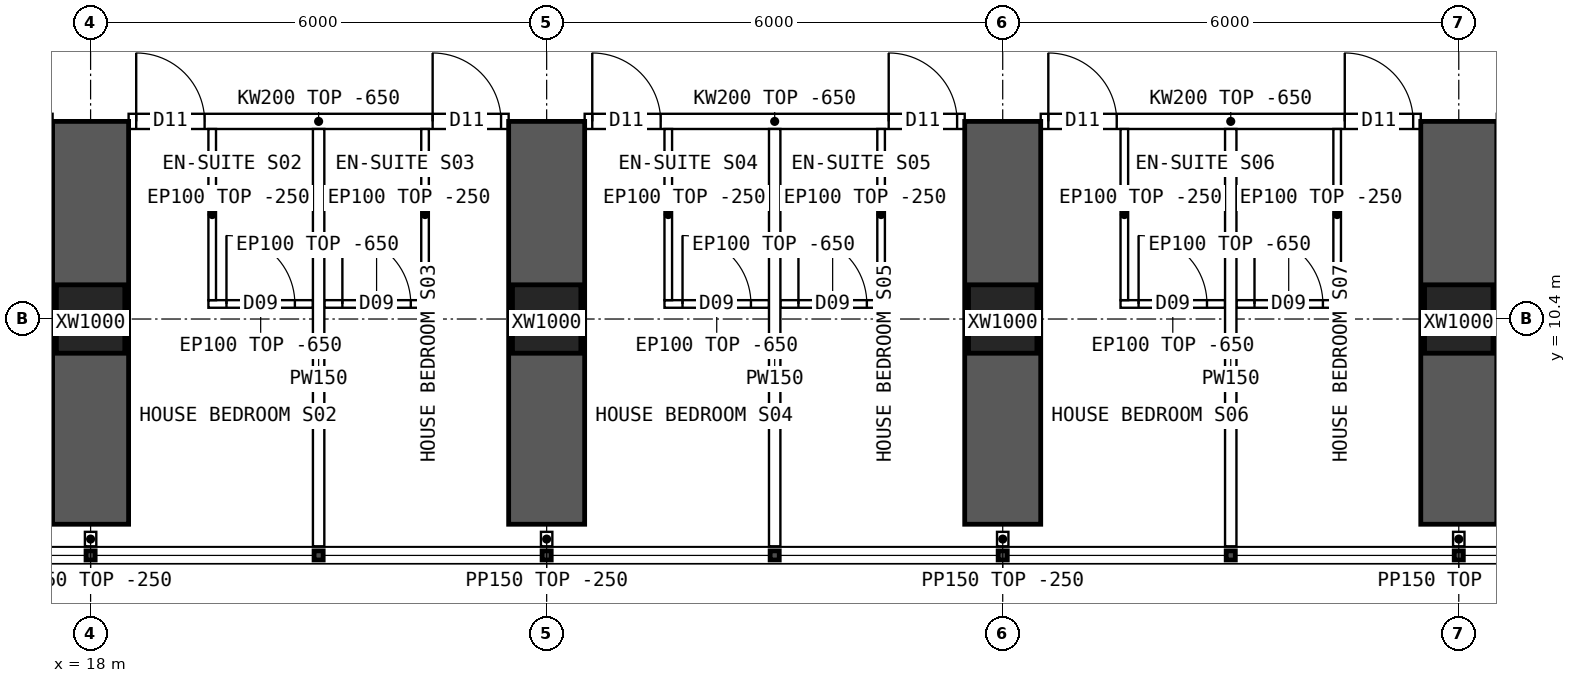
"""IFC4 building model, lengths in metres.
Left out: names, types, materials, properties, quantities, classifications, styles, units other than length and angle.
Written with IfcOpenShell. Run it as: python <this file> out.ifc"""

import sys

from ifc_helpers import new_model, si_unit, direction, frame, frame_2d, origin, origin_2d, place, context, subcontext, project, spatial, polyline, rectangle, hollow_rectangle, outline, extrude, element, fill, save


model = new_model("IFC4")
c1 = context("Model", 3, precision=1e-05, world=origin(), true_north=direction((0.0, 1.0)))
c2 = subcontext(c1, "Body", "Model", "MODEL_VIEW")
j1 = project(units=[si_unit("LENGTHUNIT", "METRE"), si_unit("PLANEANGLEUNIT", "RADIAN")], contexts=[c1])
p1 = place(None, origin())
s1 = spatial("IfcSite", under=j1, at=p1, CompositionType="ELEMENT")
p2 = place(p1, origin())
s2 = spatial("IfcBuilding", under=s1, at=p2, CompositionType="ELEMENT")
p3 = place(p2, frame((0.0, 0.0, 38.95)))
s3 = spatial("IfcBuildingStorey", under=s2, at=p3, CompositionType="ELEMENT", Elevation=38.95)
for number, where, z_axis, x_axis in (
    (1, (18.0, 10.4, 0.0), (0.0, 0.0, 1.0), (1.0, 0.0, 0.0)),
    (2, (24.0, 10.4, 0.0), (0.0, 0.0, 1.0), (1.0, 0.0, 0.0)),
    (3, (30.0, 10.4, 0.0), (0.0, 0.0, 1.0), (1.0, 0.0, 0.0)),
    (4, (36.0, 10.4, 0.0), (0.0, 0.0, 1.0), (1.0, 0.0, 0.0)),
):
    element("IfcColumn", number, at=place(p3, frame(where, z_axis=z_axis, x_axis=x_axis)), inside=s3, PredefinedType="COLUMN", context=c2, shape_type="SweptSolid", body=[
        extrude(hollow_rectangle(XDim=0.9, YDim=0.9, WallThickness=0.09, at=origin_2d()), origin(), (0.0, 0.0, 1.0), 3.75),
    ])
for number, where, z_axis, x_axis in (
    (5, (18.0, 7.7, 0.0), (0.0, 0.0, 1.0), (0.0, 1.0, 0.0)),
    (6, (24.0, 7.7, 0.0), (0.0, 0.0, 1.0), (0.0, 1.0, 0.0)),
    (7, (30.0, 7.7, 0.0), (0.0, 0.0, 1.0), (0.0, 1.0, 0.0)),
    (8, (36.0, 7.7, 0.0), (0.0, 0.0, 1.0), (0.0, 1.0, 0.0)),
):
    element("IfcWall", number, at=place(p3, frame(where, z_axis=z_axis, x_axis=x_axis)), inside=s3, PredefinedType="SHEAR", context=c2, shape_type="SweptSolid", body=[
        extrude(rectangle(XDim=5.3, YDim=1.0, at=frame_2d((2.65, 0.0))), origin(), (0.0, 0.0, 1.0), 3.75),
    ])
p4 = place(p3, frame((18.5, 13.0, 0.0), z_axis=(0.0, 0.0, 1.0), x_axis=(1.0, 0.0, 0.0)))
e9 = element("IfcWall", 9, at=p4, inside=s3, PredefinedType="SOLIDWALL", context=c2, shape_type="SweptSolid", body=[
    extrude(outline(polyline([(0.0, 0.0), (5.0, 0.0), (5.0, 3.1), (0.0, 3.1), (0.0, 0.0)])), frame((0.0, 0.1, 0.0), z_axis=(0.0, -1.0, 0.0), x_axis=(1.0, 0.0, 0.0)), (0.0, 0.0, 1.0), 0.2),
])
p5 = place(p4, frame((0.1, 0.0, 0.0)))
e10 = element("IfcOpeningElement", 10, at=p5, cuts=e9, PredefinedType="OPENING", context=c2, shape_type="SweptSolid", body=[
    extrude(rectangle(XDim=0.9, YDim=2.1, at=frame_2d((0.45, 1.05))), frame((0.0, 0.11, 0.0), z_axis=(0.0, -1.0, 0.0), x_axis=(1.0, 0.0, 0.0)), (0.0, 0.0, 1.0), 0.22),
])
p6 = place(p4, frame((4.0, 0.0, 0.0)))
e11 = element("IfcOpeningElement", 11, at=p6, cuts=e9, PredefinedType="OPENING", context=c2, shape_type="SweptSolid", body=[
    extrude(rectangle(XDim=0.9, YDim=2.1, at=frame_2d((0.45, 1.05))), frame((0.0, 0.11, 0.0), z_axis=(0.0, -1.0, 0.0), x_axis=(1.0, 0.0, 0.0)), (0.0, 0.0, 1.0), 0.22),
])
p7 = place(p3, frame((24.5, 13.0, 0.0), z_axis=(0.0, 0.0, 1.0), x_axis=(1.0, 0.0, 0.0)))
e12 = element("IfcWall", 12, at=p7, inside=s3, PredefinedType="SOLIDWALL", context=c2, shape_type="SweptSolid", body=[
    extrude(outline(polyline([(0.0, 0.0), (5.0, 0.0), (5.0, 3.1), (0.0, 3.1), (0.0, 0.0)])), frame((0.0, 0.1, 0.0), z_axis=(0.0, -1.0, 0.0), x_axis=(1.0, 0.0, 0.0)), (0.0, 0.0, 1.0), 0.2),
])
p8 = place(p7, frame((0.1, 0.0, 0.0)))
e13 = element("IfcOpeningElement", 13, at=p8, cuts=e12, PredefinedType="OPENING", context=c2, shape_type="SweptSolid", body=[
    extrude(rectangle(XDim=0.9, YDim=2.1, at=frame_2d((0.45, 1.05))), frame((0.0, 0.11, 0.0), z_axis=(0.0, -1.0, 0.0), x_axis=(1.0, 0.0, 0.0)), (0.0, 0.0, 1.0), 0.22),
])
p9 = place(p7, frame((4.0, 0.0, 0.0)))
e14 = element("IfcOpeningElement", 14, at=p9, cuts=e12, PredefinedType="OPENING", context=c2, shape_type="SweptSolid", body=[
    extrude(rectangle(XDim=0.9, YDim=2.1, at=frame_2d((0.45, 1.05))), frame((0.0, 0.11, 0.0), z_axis=(0.0, -1.0, 0.0), x_axis=(1.0, 0.0, 0.0)), (0.0, 0.0, 1.0), 0.22),
])
p10 = place(p3, frame((30.5, 13.0, 0.0), z_axis=(0.0, 0.0, 1.0), x_axis=(1.0, 0.0, 0.0)))
e15 = element("IfcWall", 15, at=p10, inside=s3, PredefinedType="SOLIDWALL", context=c2, shape_type="SweptSolid", body=[
    extrude(outline(polyline([(0.0, 0.0), (5.0, 0.0), (5.0, 3.1), (0.0, 3.1), (0.0, 0.0)])), frame((0.0, 0.1, 0.0), z_axis=(0.0, -1.0, 0.0), x_axis=(1.0, 0.0, 0.0)), (0.0, 0.0, 1.0), 0.2),
])
p11 = place(p10, frame((0.1, 0.0, 0.0)))
e16 = element("IfcOpeningElement", 16, at=p11, cuts=e15, PredefinedType="OPENING", context=c2, shape_type="SweptSolid", body=[
    extrude(rectangle(XDim=0.9, YDim=2.1, at=frame_2d((0.45, 1.05))), frame((0.0, 0.11, 0.0), z_axis=(0.0, -1.0, 0.0), x_axis=(1.0, 0.0, 0.0)), (0.0, 0.0, 1.0), 0.22),
])
p12 = place(p10, frame((4.0, 0.0, 0.0)))
e17 = element("IfcOpeningElement", 17, at=p12, cuts=e15, PredefinedType="OPENING", context=c2, shape_type="SweptSolid", body=[
    extrude(rectangle(XDim=0.9, YDim=2.1, at=frame_2d((0.45, 1.05))), frame((0.0, 0.11, 0.0), z_axis=(0.0, -1.0, 0.0), x_axis=(1.0, 0.0, 0.0)), (0.0, 0.0, 1.0), 0.22),
])
p13 = place(p3, frame((21.0, 7.41, 0.0), z_axis=(0.0, 0.0, 1.0), x_axis=(0.0, 1.0, 0.0)))
e18 = element("IfcWall", 18, at=p13, inside=s3, PredefinedType="PARTITIONING", context=c2, shape_type="SweptSolid", body=[
    extrude(outline(polyline([(0.0, 0.0), (5.49, 0.0), (5.49, 3.1), (5.442, 3.1), (5.44, 3.5), (3.192, 3.5), (3.19, 3.1), (2.792, 3.1), (2.79, 3.5), (0.0, 3.5), (0.0, 0.0)])), frame((0.0, 0.075, 0.0), z_axis=(0.0, -1.0, 0.0), x_axis=(1.0, 0.0, 0.0)), (0.0, 0.0, 1.0), 0.15),
])
p14 = place(p3, frame((20.925, 10.598, 0.0), z_axis=(0.0, 0.0, 1.0), x_axis=(-1.0, 0.0, 0.0)))
e19 = element("IfcWall", 19, at=p14, inside=s3, PredefinedType="PARTITIONING", context=c2, shape_type="SweptSolid", body=[
    extrude(outline(polyline([(0.0, 0.0), (1.375, 0.0), (1.375, 3.1), (0.0, 3.1), (0.0, 0.0)])), frame((0.0, 0.05, 0.0), z_axis=(0.0, -1.0, 0.0), x_axis=(1.0, 0.0, 0.0)), (0.0, 0.0, 1.0), 0.1),
])
p15 = place(p14, frame((0.238, 0.0, 0.0)))
e20 = element("IfcOpeningElement", 20, at=p15, cuts=e19, PredefinedType="OPENING", context=c2, shape_type="SweptSolid", body=[
    extrude(rectangle(XDim=0.9, YDim=2.1, at=frame_2d((0.45, 1.05))), frame((0.0, 0.06, 0.0), z_axis=(0.0, -1.0, 0.0), x_axis=(1.0, 0.0, 0.0)), (0.0, 0.0, 1.0), 0.12),
])
p16 = place(p3, frame((19.6, 10.648, 0.0), z_axis=(0.0, 0.0, 1.0), x_axis=(0.0, 1.0, 0.0)))
e21 = element("IfcWall", 21, at=p16, inside=s3, PredefinedType="PARTITIONING", context=c2, shape_type="SweptSolid", body=[
    extrude(outline(polyline([(0.0, 0.0), (2.252, 0.0), (2.252, 3.1), (2.204, 3.1), (2.202, 3.5), (0.0, 3.5), (0.0, 0.0)])), frame((0.0, 0.05, 0.0), z_axis=(0.0, -1.0, 0.0), x_axis=(1.0, 0.0, 0.0)), (0.0, 0.0, 1.0), 0.1),
])
p17 = place(p3, frame((22.45, 10.598, 0.0), z_axis=(0.0, 0.0, 1.0), x_axis=(-1.0, 0.0, 0.0)))
e22 = element("IfcWall", 22, at=p17, inside=s3, PredefinedType="PARTITIONING", context=c2, shape_type="SweptSolid", body=[
    extrude(outline(polyline([(0.0, 0.0), (1.375, 0.0), (1.375, 3.1), (0.0, 3.1), (0.0, 0.0)])), frame((0.0, 0.05, 0.0), z_axis=(0.0, -1.0, 0.0), x_axis=(1.0, 0.0, 0.0)), (0.0, 0.0, 1.0), 0.1),
])
p18 = place(p17, frame((0.238, 0.0, 0.0)))
e23 = element("IfcOpeningElement", 23, at=p18, cuts=e22, PredefinedType="OPENING", context=c2, shape_type="SweptSolid", body=[
    extrude(rectangle(XDim=0.9, YDim=2.1, at=frame_2d((0.45, 1.05))), frame((0.0, 0.06, 0.0), z_axis=(0.0, -1.0, 0.0), x_axis=(1.0, 0.0, 0.0)), (0.0, 0.0, 1.0), 0.12),
])
p19 = place(p3, frame((22.4, 10.648, 0.0), z_axis=(0.0, 0.0, 1.0), x_axis=(0.0, 1.0, 0.0)))
e24 = element("IfcWall", 24, at=p19, inside=s3, PredefinedType="PARTITIONING", context=c2, shape_type="SweptSolid", body=[
    extrude(outline(polyline([(0.0, 0.0), (2.252, 0.0), (2.252, 3.1), (2.204, 3.1), (2.202, 3.5), (0.0, 3.5), (0.0, 0.0)])), frame((0.0, 0.05, 0.0), z_axis=(0.0, -1.0, 0.0), x_axis=(1.0, 0.0, 0.0)), (0.0, 0.0, 1.0), 0.1),
])
p20 = place(p3, frame((27.0, 7.41, 0.0), z_axis=(0.0, 0.0, 1.0), x_axis=(0.0, 1.0, 0.0)))
e25 = element("IfcWall", 25, at=p20, inside=s3, PredefinedType="PARTITIONING", context=c2, shape_type="SweptSolid", body=[
    extrude(outline(polyline([(0.0, 0.0), (5.49, 0.0), (5.49, 3.1), (5.442, 3.1), (5.44, 3.5), (3.192, 3.5), (3.19, 3.1), (2.792, 3.1), (2.79, 3.5), (0.0, 3.5), (0.0, 0.0)])), frame((0.0, 0.075, 0.0), z_axis=(0.0, -1.0, 0.0), x_axis=(1.0, 0.0, 0.0)), (0.0, 0.0, 1.0), 0.15),
])
p21 = place(p3, frame((26.925, 10.598, 0.0), z_axis=(0.0, 0.0, 1.0), x_axis=(-1.0, 0.0, 0.0)))
e26 = element("IfcWall", 26, at=p21, inside=s3, PredefinedType="PARTITIONING", context=c2, shape_type="SweptSolid", body=[
    extrude(outline(polyline([(0.0, 0.0), (1.375, 0.0), (1.375, 3.1), (0.0, 3.1), (0.0, 0.0)])), frame((0.0, 0.05, 0.0), z_axis=(0.0, -1.0, 0.0), x_axis=(1.0, 0.0, 0.0)), (0.0, 0.0, 1.0), 0.1),
])
p22 = place(p21, frame((0.238, 0.0, 0.0)))
e27 = element("IfcOpeningElement", 27, at=p22, cuts=e26, PredefinedType="OPENING", context=c2, shape_type="SweptSolid", body=[
    extrude(rectangle(XDim=0.9, YDim=2.1, at=frame_2d((0.45, 1.05))), frame((0.0, 0.06, 0.0), z_axis=(0.0, -1.0, 0.0), x_axis=(1.0, 0.0, 0.0)), (0.0, 0.0, 1.0), 0.12),
])
p23 = place(p3, frame((25.6, 10.648, 0.0), z_axis=(0.0, 0.0, 1.0), x_axis=(0.0, 1.0, 0.0)))
e28 = element("IfcWall", 28, at=p23, inside=s3, PredefinedType="PARTITIONING", context=c2, shape_type="SweptSolid", body=[
    extrude(outline(polyline([(0.0, 0.0), (2.252, 0.0), (2.252, 3.1), (2.204, 3.1), (2.202, 3.5), (0.0, 3.5), (0.0, 0.0)])), frame((0.0, 0.05, 0.0), z_axis=(0.0, -1.0, 0.0), x_axis=(1.0, 0.0, 0.0)), (0.0, 0.0, 1.0), 0.1),
])
p24 = place(p3, frame((28.45, 10.598, 0.0), z_axis=(0.0, 0.0, 1.0), x_axis=(-1.0, 0.0, 0.0)))
e29 = element("IfcWall", 29, at=p24, inside=s3, PredefinedType="PARTITIONING", context=c2, shape_type="SweptSolid", body=[
    extrude(outline(polyline([(0.0, 0.0), (1.375, 0.0), (1.375, 3.1), (0.0, 3.1), (0.0, 0.0)])), frame((0.0, 0.05, 0.0), z_axis=(0.0, -1.0, 0.0), x_axis=(1.0, 0.0, 0.0)), (0.0, 0.0, 1.0), 0.1),
])
p25 = place(p24, frame((0.238, 0.0, 0.0)))
e30 = element("IfcOpeningElement", 30, at=p25, cuts=e29, PredefinedType="OPENING", context=c2, shape_type="SweptSolid", body=[
    extrude(rectangle(XDim=0.9, YDim=2.1, at=frame_2d((0.45, 1.05))), frame((0.0, 0.06, 0.0), z_axis=(0.0, -1.0, 0.0), x_axis=(1.0, 0.0, 0.0)), (0.0, 0.0, 1.0), 0.12),
])
p26 = place(p3, frame((28.4, 10.648, 0.0), z_axis=(0.0, 0.0, 1.0), x_axis=(0.0, 1.0, 0.0)))
e31 = element("IfcWall", 31, at=p26, inside=s3, PredefinedType="PARTITIONING", context=c2, shape_type="SweptSolid", body=[
    extrude(outline(polyline([(0.0, 0.0), (2.252, 0.0), (2.252, 3.1), (2.204, 3.1), (2.202, 3.5), (0.0, 3.5), (0.0, 0.0)])), frame((0.0, 0.05, 0.0), z_axis=(0.0, -1.0, 0.0), x_axis=(1.0, 0.0, 0.0)), (0.0, 0.0, 1.0), 0.1),
])
p27 = place(p3, frame((33.0, 7.41, 0.0), z_axis=(0.0, 0.0, 1.0), x_axis=(0.0, 1.0, 0.0)))
e32 = element("IfcWall", 32, at=p27, inside=s3, PredefinedType="PARTITIONING", context=c2, shape_type="SweptSolid", body=[
    extrude(outline(polyline([(0.0, 0.0), (5.49, 0.0), (5.49, 3.1), (5.442, 3.1), (5.44, 3.5), (3.192, 3.5), (3.19, 3.1), (2.792, 3.1), (2.79, 3.5), (0.0, 3.5), (0.0, 0.0)])), frame((0.0, 0.075, 0.0), z_axis=(0.0, -1.0, 0.0), x_axis=(1.0, 0.0, 0.0)), (0.0, 0.0, 1.0), 0.15),
])
p28 = place(p3, frame((32.925, 10.598, 0.0), z_axis=(0.0, 0.0, 1.0), x_axis=(-1.0, 0.0, 0.0)))
e33 = element("IfcWall", 33, at=p28, inside=s3, PredefinedType="PARTITIONING", context=c2, shape_type="SweptSolid", body=[
    extrude(outline(polyline([(0.0, 0.0), (1.375, 0.0), (1.375, 3.1), (0.0, 3.1), (0.0, 0.0)])), frame((0.0, 0.05, 0.0), z_axis=(0.0, -1.0, 0.0), x_axis=(1.0, 0.0, 0.0)), (0.0, 0.0, 1.0), 0.1),
])
p29 = place(p28, frame((0.238, 0.0, 0.0)))
e34 = element("IfcOpeningElement", 34, at=p29, cuts=e33, PredefinedType="OPENING", context=c2, shape_type="SweptSolid", body=[
    extrude(rectangle(XDim=0.9, YDim=2.1, at=frame_2d((0.45, 1.05))), frame((0.0, 0.06, 0.0), z_axis=(0.0, -1.0, 0.0), x_axis=(1.0, 0.0, 0.0)), (0.0, 0.0, 1.0), 0.12),
])
p30 = place(p3, frame((31.6, 10.648, 0.0), z_axis=(0.0, 0.0, 1.0), x_axis=(0.0, 1.0, 0.0)))
e35 = element("IfcWall", 35, at=p30, inside=s3, PredefinedType="PARTITIONING", context=c2, shape_type="SweptSolid", body=[
    extrude(outline(polyline([(0.0, 0.0), (2.252, 0.0), (2.252, 3.1), (2.204, 3.1), (2.202, 3.5), (0.0, 3.5), (0.0, 0.0)])), frame((0.0, 0.05, 0.0), z_axis=(0.0, -1.0, 0.0), x_axis=(1.0, 0.0, 0.0)), (0.0, 0.0, 1.0), 0.1),
])
p31 = place(p3, frame((34.45, 10.598, 0.0), z_axis=(0.0, 0.0, 1.0), x_axis=(-1.0, 0.0, 0.0)))
e36 = element("IfcWall", 36, at=p31, inside=s3, PredefinedType="PARTITIONING", context=c2, shape_type="SweptSolid", body=[
    extrude(outline(polyline([(0.0, 0.0), (1.375, 0.0), (1.375, 3.1), (0.0, 3.1), (0.0, 0.0)])), frame((0.0, 0.05, 0.0), z_axis=(0.0, -1.0, 0.0), x_axis=(1.0, 0.0, 0.0)), (0.0, 0.0, 1.0), 0.1),
])
p32 = place(p31, frame((0.238, 0.0, 0.0)))
e37 = element("IfcOpeningElement", 37, at=p32, cuts=e36, PredefinedType="OPENING", context=c2, shape_type="SweptSolid", body=[
    extrude(rectangle(XDim=0.9, YDim=2.1, at=frame_2d((0.45, 1.05))), frame((0.0, 0.06, 0.0), z_axis=(0.0, -1.0, 0.0), x_axis=(1.0, 0.0, 0.0)), (0.0, 0.0, 1.0), 0.12),
])
p33 = place(p3, frame((34.4, 10.648, 0.0), z_axis=(0.0, 0.0, 1.0), x_axis=(0.0, 1.0, 0.0)))
e38 = element("IfcWall", 38, at=p33, inside=s3, PredefinedType="PARTITIONING", context=c2, shape_type="SweptSolid", body=[
    extrude(outline(polyline([(0.0, 0.0), (2.252, 0.0), (2.252, 3.1), (2.204, 3.1), (2.202, 3.5), (0.0, 3.5), (0.0, 0.0)])), frame((0.0, 0.05, 0.0), z_axis=(0.0, -1.0, 0.0), x_axis=(1.0, 0.0, 0.0)), (0.0, 0.0, 1.0), 0.1),
])
for number, where, z_axis, x_axis in (
    (39, (18.0, 7.6, 0.0), (0.0, 0.0, 1.0), (0.0, -1.0, 0.0)),
    (40, (24.0, 7.6, 0.0), (0.0, 0.0, 1.0), (0.0, -1.0, 0.0)),
    (41, (30.0, 7.6, 0.0), (0.0, 0.0, 1.0), (0.0, -1.0, 0.0)),
    (42, (36.0, 7.6, 0.0), (0.0, 0.0, 1.0), (0.0, -1.0, 0.0)),
):
    element("IfcWall", number, at=place(p3, frame(where, z_axis=z_axis, x_axis=x_axis)), inside=s3, PredefinedType="PARTITIONING", context=c2, shape_type="SweptSolid", body=[
        extrude(rectangle(XDim=0.19, YDim=0.15, at=frame_2d((0.095, 0.0))), origin(), (0.0, 0.0, 1.0), 3.5),
    ])
p34 = place(p15, origin())
e43 = element("IfcDoor", 43, at=p34, inside=s3, OperationType="SINGLE_SWING_RIGHT", PredefinedType="DOOR", context=c2, shape_type="SweptSolid", body=[
    extrude(rectangle(XDim=0.9, YDim=2.1, at=frame_2d((0.45, 1.05))), frame((0.0, 0.025, 0.0), z_axis=(0.0, -1.0, 0.0), x_axis=(1.0, 0.0, 0.0)), (0.0, 0.0, 1.0), 0.05),
])
fill(e20, e43)
p35 = place(p5, origin())
e44 = element("IfcDoor", 44, at=p35, inside=s3, OperationType="SINGLE_SWING_LEFT", PredefinedType="DOOR", context=c2, shape_type="SweptSolid", body=[
    extrude(rectangle(XDim=0.9, YDim=2.1, at=frame_2d((0.45, 1.05))), frame((0.0, 0.025, 0.0), z_axis=(0.0, -1.0, 0.0), x_axis=(1.0, 0.0, 0.0)), (0.0, 0.0, 1.0), 0.05),
])
fill(e10, e44)
p36 = place(p18, origin())
e45 = element("IfcDoor", 45, at=p36, inside=s3, OperationType="SINGLE_SWING_RIGHT", PredefinedType="DOOR", context=c2, shape_type="SweptSolid", body=[
    extrude(rectangle(XDim=0.9, YDim=2.1, at=frame_2d((0.45, 1.05))), frame((0.0, 0.025, 0.0), z_axis=(0.0, -1.0, 0.0), x_axis=(1.0, 0.0, 0.0)), (0.0, 0.0, 1.0), 0.05),
])
fill(e23, e45)
p37 = place(p6, origin())
e46 = element("IfcDoor", 46, at=p37, inside=s3, OperationType="SINGLE_SWING_LEFT", PredefinedType="DOOR", context=c2, shape_type="SweptSolid", body=[
    extrude(rectangle(XDim=0.9, YDim=2.1, at=frame_2d((0.45, 1.05))), frame((0.0, 0.025, 0.0), z_axis=(0.0, -1.0, 0.0), x_axis=(1.0, 0.0, 0.0)), (0.0, 0.0, 1.0), 0.05),
])
fill(e11, e46)
p38 = place(p22, origin())
e47 = element("IfcDoor", 47, at=p38, inside=s3, OperationType="SINGLE_SWING_RIGHT", PredefinedType="DOOR", context=c2, shape_type="SweptSolid", body=[
    extrude(rectangle(XDim=0.9, YDim=2.1, at=frame_2d((0.45, 1.05))), frame((0.0, 0.025, 0.0), z_axis=(0.0, -1.0, 0.0), x_axis=(1.0, 0.0, 0.0)), (0.0, 0.0, 1.0), 0.05),
])
fill(e27, e47)
p39 = place(p8, origin())
e48 = element("IfcDoor", 48, at=p39, inside=s3, OperationType="SINGLE_SWING_LEFT", PredefinedType="DOOR", context=c2, shape_type="SweptSolid", body=[
    extrude(rectangle(XDim=0.9, YDim=2.1, at=frame_2d((0.45, 1.05))), frame((0.0, 0.025, 0.0), z_axis=(0.0, -1.0, 0.0), x_axis=(1.0, 0.0, 0.0)), (0.0, 0.0, 1.0), 0.05),
])
fill(e13, e48)
p40 = place(p25, origin())
e49 = element("IfcDoor", 49, at=p40, inside=s3, OperationType="SINGLE_SWING_RIGHT", PredefinedType="DOOR", context=c2, shape_type="SweptSolid", body=[
    extrude(rectangle(XDim=0.9, YDim=2.1, at=frame_2d((0.45, 1.05))), frame((0.0, 0.025, 0.0), z_axis=(0.0, -1.0, 0.0), x_axis=(1.0, 0.0, 0.0)), (0.0, 0.0, 1.0), 0.05),
])
fill(e30, e49)
p41 = place(p9, origin())
e50 = element("IfcDoor", 50, at=p41, inside=s3, OperationType="SINGLE_SWING_LEFT", PredefinedType="DOOR", context=c2, shape_type="SweptSolid", body=[
    extrude(rectangle(XDim=0.9, YDim=2.1, at=frame_2d((0.45, 1.05))), frame((0.0, 0.025, 0.0), z_axis=(0.0, -1.0, 0.0), x_axis=(1.0, 0.0, 0.0)), (0.0, 0.0, 1.0), 0.05),
])
fill(e14, e50)
p42 = place(p29, origin())
e51 = element("IfcDoor", 51, at=p42, inside=s3, OperationType="SINGLE_SWING_RIGHT", PredefinedType="DOOR", context=c2, shape_type="SweptSolid", body=[
    extrude(rectangle(XDim=0.9, YDim=2.1, at=frame_2d((0.45, 1.05))), frame((0.0, 0.025, 0.0), z_axis=(0.0, -1.0, 0.0), x_axis=(1.0, 0.0, 0.0)), (0.0, 0.0, 1.0), 0.05),
])
fill(e34, e51)
p43 = place(p11, origin())
e52 = element("IfcDoor", 52, at=p43, inside=s3, OperationType="SINGLE_SWING_LEFT", PredefinedType="DOOR", context=c2, shape_type="SweptSolid", body=[
    extrude(rectangle(XDim=0.9, YDim=2.1, at=frame_2d((0.45, 1.05))), frame((0.0, 0.025, 0.0), z_axis=(0.0, -1.0, 0.0), x_axis=(1.0, 0.0, 0.0)), (0.0, 0.0, 1.0), 0.05),
])
fill(e16, e52)
p44 = place(p32, origin())
e53 = element("IfcDoor", 53, at=p44, inside=s3, OperationType="SINGLE_SWING_RIGHT", PredefinedType="DOOR", context=c2, shape_type="SweptSolid", body=[
    extrude(rectangle(XDim=0.9, YDim=2.1, at=frame_2d((0.45, 1.05))), frame((0.0, 0.025, 0.0), z_axis=(0.0, -1.0, 0.0), x_axis=(1.0, 0.0, 0.0)), (0.0, 0.0, 1.0), 0.05),
])
fill(e37, e53)
p45 = place(p12, origin())
e54 = element("IfcDoor", 54, at=p45, inside=s3, OperationType="SINGLE_SWING_LEFT", PredefinedType="DOOR", context=c2, shape_type="SweptSolid", body=[
    extrude(rectangle(XDim=0.9, YDim=2.1, at=frame_2d((0.45, 1.05))), frame((0.0, 0.025, 0.0), z_axis=(0.0, -1.0, 0.0), x_axis=(1.0, 0.0, 0.0)), (0.0, 0.0, 1.0), 0.05),
])
fill(e17, e54)
save(model, sys.argv[1])
